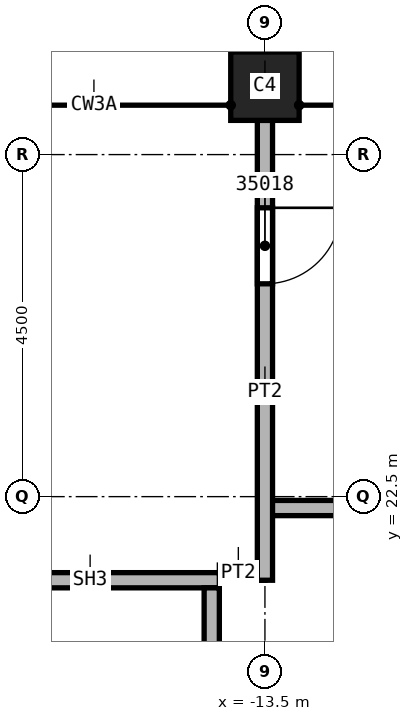
"""IFC4 building model, lengths in metres.
Left out: names, types, materials, properties, quantities, classifications, styles, units other than length and angle.
Written with IfcOpenShell. Run it as: python <this file> out.ifc"""

import sys

from ifc_helpers import new_model, si_unit, direction, frame, frame_2d, origin, origin_2d, place, context, subcontext, project, spatial, rectangle, extrude, element, fill, save


model = new_model("IFC4")
c1 = context("Model", 3, precision=1e-05, world=origin(), true_north=direction((0.0, 1.0)))
c2 = subcontext(c1, "Body", "Model", "MODEL_VIEW")
j1 = project(units=[si_unit("LENGTHUNIT", "METRE"), si_unit("PLANEANGLEUNIT", "RADIAN")], contexts=[c1])
p1 = place(None, origin())
s1 = spatial("IfcSite", under=j1, at=p1, CompositionType="ELEMENT")
p2 = place(p1, origin())
s2 = spatial("IfcBuilding", under=s1, at=p2, CompositionType="ELEMENT")
p3 = place(p2, frame((0.0, 0.0, 376.0)))
s3 = spatial("IfcBuildingStorey", under=s2, at=p3, CompositionType="ELEMENT", Elevation=376.0)
p4 = place(p3, frame((-13.5, 27.9, 0.0), z_axis=(0.0, 0.0, 1.0), x_axis=(1.0, 0.0, 0.0)))
e1 = element("IfcColumn", 1, at=p4, inside=s3, PredefinedType="COLUMN", context=c2, shape_type="SweptSolid", body=[
    extrude(rectangle(XDim=0.9, YDim=0.9, at=origin_2d()), origin(), (0.0, 0.0, 1.0), 4.6),
])
p5 = place(p3, frame((-13.5, 21.5, 0.0), z_axis=(0.0, 0.0, 1.0), x_axis=(-1.0, 0.0, 0.0)))
e2 = element("IfcWall", 2, at=p5, inside=s3, PredefinedType="PARTITIONING", context=c2, shape_type="SweptSolid", body=[
    extrude(rectangle(XDim=0.6, YDim=0.2, at=frame_2d((0.3, 0.0))), origin(), (0.0, 0.0, 1.0), 4.15),
])
p6 = place(p3, frame((-13.5, 22.35, 0.0), z_axis=(0.0, 0.0, 1.0), x_axis=(1.0, 0.0, 0.0)))
e3 = element("IfcWall", 3, at=p6, inside=s3, PredefinedType="PARTITIONING", context=c2, shape_type="SweptSolid", body=[
    extrude(rectangle(XDim=10.6, YDim=0.2, at=frame_2d((5.3, 0.0))), origin(), (0.0, 0.0, 1.0), 4.15),
])
p7 = place(p3, frame((-13.5, 27.45, 0.0), z_axis=(0.0, 0.0, 1.0), x_axis=(0.0, -1.0, 0.0)))
e4 = element("IfcWall", 4, at=p7, inside=s3, PredefinedType="PARTITIONING", context=c2, shape_type="SweptSolid", body=[
    extrude(rectangle(XDim=6.05, YDim=0.2, at=frame_2d((3.025, 0.0))), origin(), (0.0, 0.0, 1.0), 4.15),
])
p8 = place(p7, frame((1.15, 0.0, 0.0)))
e5 = element("IfcOpeningElement", 5, at=p8, cuts=e4, PredefinedType="OPENING", context=c2, shape_type="SweptSolid", body=[
    extrude(rectangle(XDim=1.0, YDim=2.1, at=frame_2d((0.5, 1.05))), frame((0.0, 0.1, 0.0), z_axis=(0.0, -1.0, 0.0), x_axis=(1.0, 0.0, 0.0)), (0.0, 0.0, 1.0), 0.2),
])
p9 = place(p3, frame((-21.9, 21.4, 0.0), z_axis=(0.0, 0.0, 1.0), x_axis=(1.0, 0.0, 0.0)))
e6 = element("IfcWall", 6, at=p9, inside=s3, PredefinedType="SOLIDWALL", context=c2, shape_type="SweptSolid", body=[
    extrude(rectangle(XDim=7.8, YDim=0.2, at=frame_2d((3.9, 0.0))), origin(), (0.0, 0.0, 1.0), 4.15),
])
p10 = place(p9, frame((3.2, 0.0, 0.0)))
e7 = element("IfcOpeningElement", 7, at=p10, cuts=e6, PredefinedType="OPENING", context=c2, shape_type="SweptSolid", body=[
    extrude(rectangle(XDim=1.2, YDim=2.1, at=frame_2d((0.6, 1.05))), frame((0.0, 0.1, 0.0), z_axis=(0.0, -1.0, 0.0), x_axis=(1.0, 0.0, 0.0)), (0.0, 0.0, 1.0), 0.2),
])
p11 = place(p3, frame((-14.2, 15.4, 0.0), z_axis=(0.0, 0.0, 1.0), x_axis=(0.0, 1.0, 0.0)))
e8 = element("IfcWall", 8, at=p11, inside=s3, PredefinedType="SOLIDWALL", context=c2, shape_type="SweptSolid", body=[
    extrude(rectangle(XDim=5.9, YDim=0.2, at=frame_2d((2.95, 0.0))), origin(), (0.0, 0.0, 1.0), 4.15),
])
p12 = place(p8, origin())
e9 = element("IfcDoor", 9, at=p12, inside=s3, OperationType="SINGLE_SWING_LEFT", PredefinedType="DOOR", context=c2, shape_type="SweptSolid", body=[
    extrude(rectangle(XDim=1.0, YDim=2.1, at=frame_2d((0.5, 1.05))), frame((0.0, 0.025, 0.0), z_axis=(0.0, -1.0, 0.0), x_axis=(1.0, 0.0, 0.0)), (0.0, 0.0, 1.0), 0.05),
])
fill(e5, e9)
save(model, sys.argv[1])
